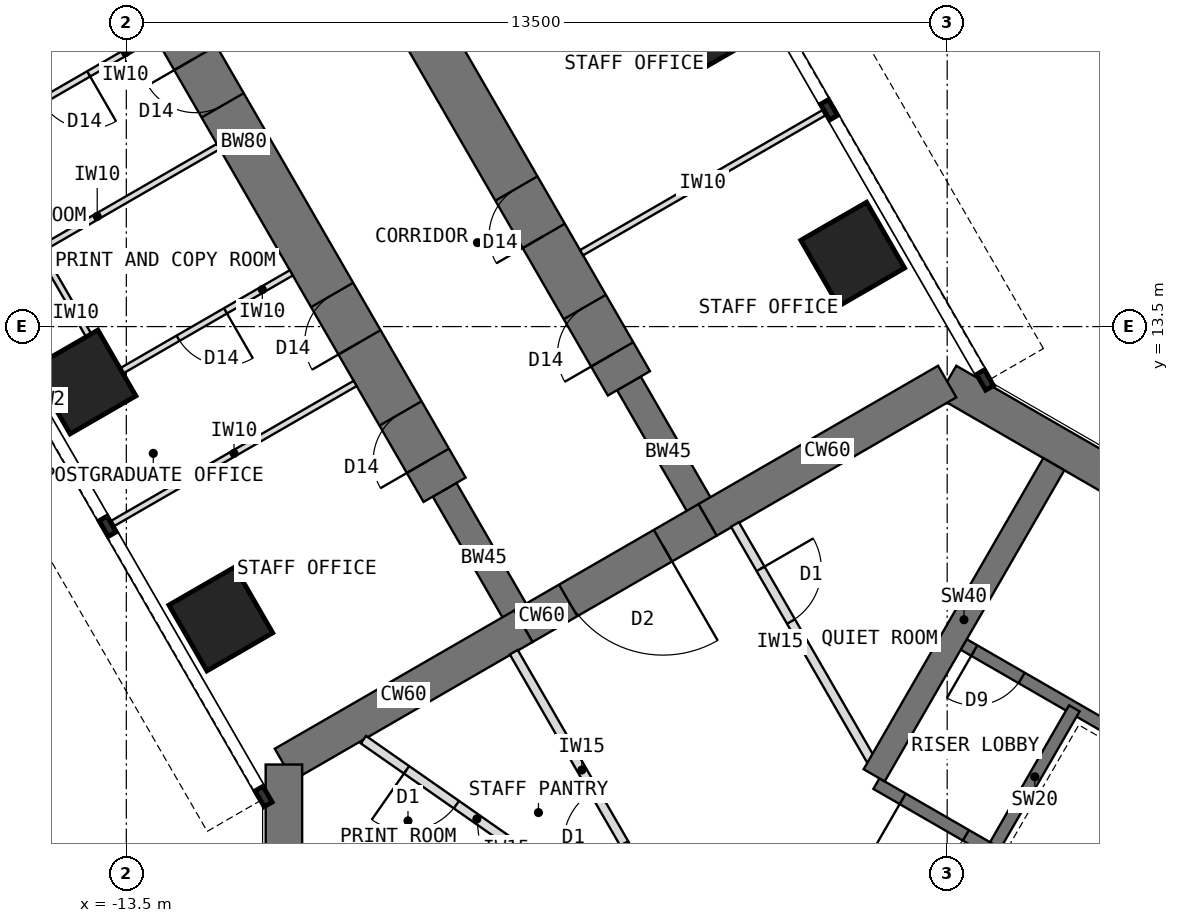
"""IFC4 building model, lengths in metres.
Left out: names, types, materials, properties, quantities, classifications, styles, units other than length and angle.
Written with IfcOpenShell. Run it as: python <this file> out.ifc"""

import sys

from ifc_helpers import new_model, si_unit, direction, frame, frame_2d, origin, origin_2d, place, context, subcontext, project, spatial, rectangle, extrude, element, fill, save


model = new_model("IFC4")
c1 = context("Model", 3, precision=1e-05, world=origin(), true_north=direction((0.0, 1.0)))
c2 = subcontext(c1, "Body", "Model", "MODEL_VIEW")
j1 = project(units=[si_unit("LENGTHUNIT", "METRE"), si_unit("PLANEANGLEUNIT", "RADIAN")], contexts=[c1])
p1 = place(None, origin())
s1 = spatial("IfcSite", under=j1, at=p1, CompositionType="ELEMENT")
p2 = place(p1, origin())
s2 = spatial("IfcBuilding", under=s1, at=p2, CompositionType="ELEMENT")
p3 = place(p2, frame((0.0, 0.0, 157.5)))
s3 = spatial("IfcBuildingStorey", under=s2, at=p3, CompositionType="ELEMENT", Elevation=157.5)
p4 = place(p3, frame((10.908, 6.298, 0.0), z_axis=(0.0, 0.0, 1.0), x_axis=(-0.866021940709, 0.500005998175, 0.0)))
e1 = element("IfcWall", 1, at=p4, inside=s3, PredefinedType="SHEAR", context=c2, shape_type="SweptSolid", body=[
    extrude(rectangle(XDim=12.596, YDim=0.6, at=frame_2d((6.298, 0.0))), origin(), (0.0, 0.0, 1.0), 4.0),
])
p5 = place(p3, frame((0.0, 12.596, 0.0), z_axis=(0.0, 0.0, 1.0), x_axis=(-0.866011268655, -0.500024481964, 0.0)))
e2 = element("IfcWall", 2, at=p5, inside=s3, PredefinedType="SHEAR", context=c2, shape_type="SweptSolid", body=[
    extrude(rectangle(XDim=4.548, YDim=0.6, at=frame_2d((2.274, 0.0))), origin(), (0.0, 0.0, 1.0), 4.0),
])
p6 = place(p3, frame((-3.939, 10.322, 0.0), z_axis=(0.0, 0.0, 1.0), x_axis=(-0.866019471182, -0.500010275428, 0.0)))
e3 = element("IfcWall", 3, at=p6, inside=s3, PredefinedType="SHEAR", context=c2, shape_type="SweptSolid", body=[
    extrude(rectangle(XDim=3.5, YDim=0.6, at=frame_2d((1.75, 0.0))), origin(), (0.0, 0.0, 1.0), 4.0),
])
p7 = place(p6, frame((0.85, 0.0, 0.0)))
e4 = element("IfcOpeningElement", 4, at=p7, cuts=e3, PredefinedType="OPENING", context=c2, shape_type="SweptSolid", body=[
    extrude(rectangle(XDim=1.8, YDim=2.1, at=frame_2d((0.9, 1.05))), frame((0.0, 0.31, 0.0), z_axis=(0.0, -1.0, 0.0), x_axis=(1.0, 0.0, 0.0)), (0.0, 0.0, 1.0), 0.62),
])
p8 = place(p3, frame((-6.97, 8.572, 0.0), z_axis=(0.0, 0.0, 1.0), x_axis=(-0.866034513004, -0.499984222037, 0.0)))
e5 = element("IfcWall", 5, at=p8, inside=s3, PredefinedType="SHEAR", context=c2, shape_type="SweptSolid", body=[
    extrude(rectangle(XDim=4.548, YDim=0.6, at=frame_2d((2.274, 0.0))), origin(), (0.0, 0.0, 1.0), 4.0),
])
p9 = place(p3, frame((-10.908, 6.298, 0.0), z_axis=(0.0, 0.0, 1.0), x_axis=(0.0, -1.0, 0.0)))
e6 = element("IfcWall", 6, at=p9, inside=s3, PredefinedType="SHEAR", context=c2, shape_type="SweptSolid", body=[
    extrude(rectangle(XDim=12.596, YDim=0.6, at=frame_2d((6.298, 0.0))), origin(), (0.0, 0.0, 1.0), 4.0),
])
p10 = place(p3, frame((-6.97, 8.572, 0.0), z_axis=(0.0, 0.0, 1.0), x_axis=(-0.499988811324, 0.866031863473, 0.0)))
e7 = element("IfcWall", 7, at=p10, inside=s3, PredefinedType="SHEAR", context=c2, shape_type="SweptSolid", body=[
    extrude(rectangle(XDim=2.592, YDim=0.45, at=frame_2d((1.296, 0.0))), origin(), (0.0, 0.0, 1.0), 4.0),
])
p11 = place(p3, frame((-8.266, 10.816, 0.0), z_axis=(0.0, 0.0, 1.0), x_axis=(-0.499996231654, 0.866027579429, 0.0)))
e8 = element("IfcWall", 8, at=p11, inside=s3, PredefinedType="SHEAR", context=c2, shape_type="SweptSolid", body=[
    extrude(rectangle(XDim=13.2, YDim=0.8, at=frame_2d((6.6, 0.0))), origin(), (0.0, 0.0, 1.0), 4.0),
])
p12 = place(p11, frame((0.55, 0.0, 0.0)))
e9 = element("IfcOpeningElement", 9, at=p12, cuts=e8, PredefinedType="OPENING", context=c2, shape_type="SweptSolid", body=[
    extrude(rectangle(XDim=0.9, YDim=2.1, at=frame_2d((0.45, 1.05))), frame((0.0, 0.41, 0.0), z_axis=(0.0, -1.0, 0.0), x_axis=(1.0, 0.0, 0.0)), (0.0, 0.0, 1.0), 0.82),
])
p13 = place(p11, frame((2.8, 0.0, 0.0)))
e10 = element("IfcOpeningElement", 10, at=p13, cuts=e8, PredefinedType="OPENING", context=c2, shape_type="SweptSolid", body=[
    extrude(rectangle(XDim=0.9, YDim=2.1, at=frame_2d((0.45, 1.05))), frame((0.0, 0.41, 0.0), z_axis=(0.0, -1.0, 0.0), x_axis=(1.0, 0.0, 0.0)), (0.0, 0.0, 1.0), 0.82),
])
p14 = place(p11, frame((7.3, 0.0, 0.0)))
e11 = element("IfcOpeningElement", 11, at=p14, cuts=e8, PredefinedType="OPENING", context=c2, shape_type="SweptSolid", body=[
    extrude(rectangle(XDim=0.9, YDim=2.1, at=frame_2d((0.45, 1.05))), frame((0.0, 0.41, 0.0), z_axis=(0.0, -1.0, 0.0), x_axis=(1.0, 0.0, 0.0)), (0.0, 0.0, 1.0), 0.82),
])
p15 = place(p3, frame((-3.939, 10.322, 0.0), z_axis=(0.0, 0.0, 1.0), x_axis=(-0.499918158782, 0.866072649678, 0.0)))
e12 = element("IfcWall", 12, at=p15, inside=s3, PredefinedType="SHEAR", context=c2, shape_type="SweptSolid", body=[
    extrude(rectangle(XDim=2.592, YDim=0.45, at=frame_2d((1.296, 0.0))), origin(), (0.0, 0.0, 1.0), 4.0),
])
p16 = place(p3, frame((-5.234, 12.566, 0.0), z_axis=(0.0, 0.0, 1.0), x_axis=(-0.500010103361, 0.866019570528, 0.0)))
e13 = element("IfcWall", 13, at=p16, inside=s3, PredefinedType="SHEAR", context=c2, shape_type="SweptSolid", body=[
    extrude(rectangle(XDim=13.2, YDim=0.8, at=frame_2d((6.6, 0.0))), origin(), (0.0, 0.0, 1.0), 4.0),
])
p17 = place(p16, frame((0.55, 0.0, 0.0)))
e14 = element("IfcOpeningElement", 14, at=p17, cuts=e13, PredefinedType="OPENING", context=c2, shape_type="SweptSolid", body=[
    extrude(rectangle(XDim=0.9, YDim=2.1, at=frame_2d((0.45, 1.05))), frame((0.0, 0.41, 0.0), z_axis=(0.0, -1.0, 0.0), x_axis=(1.0, 0.0, 0.0)), (0.0, 0.0, 1.0), 0.82),
])
p18 = place(p16, frame((2.8, 0.0, 0.0)))
e15 = element("IfcOpeningElement", 15, at=p18, cuts=e13, PredefinedType="OPENING", context=c2, shape_type="SweptSolid", body=[
    extrude(rectangle(XDim=0.9, YDim=2.1, at=frame_2d((0.45, 1.05))), frame((0.0, 0.41, 0.0), z_axis=(0.0, -1.0, 0.0), x_axis=(1.0, 0.0, 0.0)), (0.0, 0.0, 1.0), 0.82),
])
p19 = place(p16, frame((7.3, 0.0, 0.0)))
e16 = element("IfcOpeningElement", 16, at=p19, cuts=e13, PredefinedType="OPENING", context=c2, shape_type="SweptSolid", body=[
    extrude(rectangle(XDim=0.9, YDim=2.1, at=frame_2d((0.45, 1.05))), frame((0.0, 0.41, 0.0), z_axis=(0.0, -1.0, 0.0), x_axis=(1.0, 0.0, 0.0)), (0.0, 0.0, 1.0), 0.82),
])
for number, where, z_axis, x_axis in (
    (17, (-11.946, 8.691, 0.0), (0.0, 0.0, 1.0), (0.866, 0.5, 0.0)),
    (18, (-1.554, 14.691, 0.0), (0.0, 0.0, 1.0), (0.866, 0.5, 0.0)),
    (19, (-14.196, 12.588, 0.0), (0.0, 0.0, 1.0), (0.866, 0.5, 0.0)),
    (20, (-3.804, 18.588, 0.0), (0.0, 0.0, 1.0), (0.866, 0.5, 0.0)),
):
    element("IfcColumn", number, at=place(p3, frame(where, z_axis=z_axis, x_axis=x_axis)), inside=s3, PredefinedType="COLUMN", context=c2, shape_type="SweptSolid", body=[
        extrude(rectangle(XDim=1.25, YDim=1.25, at=origin_2d()), origin(), (0.0, 0.0, 1.0), 4.0),
    ])
p20 = place(p3, frame((5.764, 1.984, 0.0), z_axis=(0.0, 0.0, 1.0), x_axis=(-0.866026010844, 0.49999894854, 0.0)))
e21 = element("IfcWall", 21, at=p20, inside=s3, PredefinedType="SHEAR", context=c2, shape_type="SweptSolid", body=[
    extrude(rectangle(XDim=8.0, YDim=0.2, at=frame_2d((4.0, 0.0))), origin(), (0.0, 0.0, 1.0), 4.0),
])
p21 = place(p20, frame((6.3, 0.0, 0.0)))
e22 = element("IfcOpeningElement", 22, at=p21, cuts=e21, PredefinedType="OPENING", context=c2, shape_type="SweptSolid", body=[
    extrude(rectangle(XDim=1.2, YDim=2.1, at=frame_2d((0.6, 1.05))), frame((0.0, 0.11, 0.0), z_axis=(0.0, -1.0, 0.0), x_axis=(1.0, 0.0, 0.0)), (0.0, 0.0, 1.0), 0.22),
])
p22 = place(p3, frame((0.791, 4.97, 0.0), z_axis=(0.0, 0.0, 1.0), x_axis=(0.499936506574, 0.866062058628, 0.0)))
e23 = element("IfcWall", 23, at=p22, inside=s3, PredefinedType="SHEAR", context=c2, shape_type="SweptSolid", body=[
    extrude(rectangle(XDim=2.6, YDim=0.2, at=frame_2d((1.3, 0.0))), origin(), (0.0, 0.0, 1.0), 4.0),
])
p23 = place(p3, frame((7.114, 4.322, 0.0), z_axis=(0.0, 0.0, 1.0), x_axis=(-0.866026010844, 0.49999894854, 0.0)))
e24 = element("IfcWall", 24, at=p23, inside=s3, PredefinedType="SHEAR", context=c2, shape_type="SweptSolid", body=[
    extrude(rectangle(XDim=8.0, YDim=0.2, at=frame_2d((4.0, 0.0))), origin(), (0.0, 0.0, 1.0), 4.0),
])
p24 = place(p23, frame((6.8, 0.0, 0.0)))
e25 = element("IfcOpeningElement", 25, at=p24, cuts=e24, PredefinedType="OPENING", context=c2, shape_type="SweptSolid", body=[
    extrude(rectangle(XDim=0.9, YDim=2.1, at=frame_2d((0.45, 1.05))), frame((0.0, 0.11, 0.0), z_axis=(0.0, -1.0, 0.0), x_axis=(1.0, 0.0, 0.0)), (0.0, 0.0, 1.0), 0.22),
])
p25 = place(p3, frame((-1.201, 6.12, 0.0), z_axis=(0.0, 0.0, 1.0), x_axis=(0.49999668571, 0.866027317282, 0.0)))
e26 = element("IfcWall", 26, at=p25, inside=s3, PredefinedType="SHEAR", context=c2, shape_type="SweptSolid", body=[
    extrude(rectangle(XDim=5.908, YDim=0.4, at=frame_2d((2.954, 0.0))), origin(), (0.0, 0.0, 1.0), 4.0),
])
for number, where, z_axis, x_axis in (
    (27, (-9.737, 12.565, 0.0), (0.0, 0.0, 1.0), (-0.866, -0.5, 0.0)),
    (28, (-11.987, 16.462, 0.0), (0.0, 0.0, 1.0), (-0.866, -0.5, 0.0)),
):
    element("IfcWall", number, at=place(p3, frame(where, z_axis=z_axis, x_axis=x_axis)), inside=s3, PredefinedType="PARTITIONING", context=c2, shape_type="SweptSolid", body=[
        extrude(rectangle(XDim=4.6, YDim=0.1, at=frame_2d((2.3, 0.0))), origin(), (0.0, 0.0, 1.0), 3.8),
    ])
p26 = place(p3, frame((-13.731, 12.684, 0.0), z_axis=(0.0, 0.0, 1.0), x_axis=(-0.500001309137, 0.866024647952, 0.0)))
e29 = element("IfcWall", 29, at=p26, inside=s3, PredefinedType="PARTITIONING", context=c2, shape_type="SweptSolid", body=[
    extrude(rectangle(XDim=2.4, YDim=0.1, at=frame_2d((1.2, 0.0))), origin(), (0.0, 0.0, 1.0), 3.8),
])
p27 = place(p3, frame((-10.787, 14.384, 0.0), z_axis=(0.0, 0.0, 1.0), x_axis=(-0.866038511948, -0.499977295307, 0.0)))
e30 = element("IfcWall", 30, at=p27, inside=s3, PredefinedType="PARTITIONING", context=c2, shape_type="SweptSolid", body=[
    extrude(rectangle(XDim=3.4, YDim=0.1, at=frame_2d((1.7, 0.0))), origin(), (0.0, 0.0, 1.0), 3.8),
])
p28 = place(p27, frame((1.25, 0.0, 0.0)))
e31 = element("IfcOpeningElement", 31, at=p28, cuts=e30, PredefinedType="OPENING", context=c2, shape_type="SweptSolid", body=[
    extrude(rectangle(XDim=0.9, YDim=2.1, at=frame_2d((0.45, 1.05))), frame((0.0, 0.06, 0.0), z_axis=(0.0, -1.0, 0.0), x_axis=(1.0, 0.0, 0.0)), (0.0, 0.0, 1.0), 0.12),
])
p29 = place(p3, frame((-13.037, 18.281, 0.0), z_axis=(0.0, 0.0, 1.0), x_axis=(-0.866007419912, -0.500031147688, 0.0)))
e32 = element("IfcWall", 32, at=p29, inside=s3, PredefinedType="PARTITIONING", context=c2, shape_type="SweptSolid", body=[
    extrude(rectangle(XDim=3.4, YDim=0.1, at=frame_2d((1.7, 0.0))), origin(), (0.0, 0.0, 1.0), 3.8),
])
p30 = place(p29, frame((1.25, 0.0, 0.0)))
e33 = element("IfcOpeningElement", 33, at=p30, cuts=e32, PredefinedType="OPENING", context=c2, shape_type="SweptSolid", body=[
    extrude(rectangle(XDim=0.9, YDim=2.1, at=frame_2d((0.45, 1.05))), frame((0.0, 0.06, 0.0), z_axis=(0.0, -1.0, 0.0), x_axis=(1.0, 0.0, 0.0)), (0.0, 0.0, 1.0), 0.12),
])
p31 = place(p3, frame((-6.013, 14.715, 0.0), z_axis=(0.0, 0.0, 1.0), x_axis=(0.866016770315, 0.500014953309, 0.0)))
e34 = element("IfcWall", 34, at=p31, inside=s3, PredefinedType="PARTITIONING", context=c2, shape_type="SweptSolid", body=[
    extrude(rectangle(XDim=4.6, YDim=0.1, at=frame_2d((2.3, 0.0))), origin(), (0.0, 0.0, 1.0), 3.8),
])
p32 = place(p3, frame((-4.89, 4.27, 0.0), z_axis=(0.0, 0.0, 1.0), x_axis=(-0.499999473313, 0.866025707867, 0.0)))
e35 = element("IfcWall", 35, at=p32, inside=s3, PredefinedType="PARTITIONING", context=c2, shape_type="SweptSolid", body=[
    extrude(rectangle(XDim=4.476, YDim=0.15, at=frame_2d((2.238, 0.0))), origin(), (0.0, 0.0, 1.0), 3.8),
])
p33 = place(p32, frame((0.843, 0.0, 0.0)))
e36 = element("IfcOpeningElement", 36, at=p33, cuts=e35, PredefinedType="OPENING", context=c2, shape_type="SweptSolid", body=[
    extrude(rectangle(XDim=1.0, YDim=2.1, at=frame_2d((0.5, 1.05))), frame((0.0, 0.085, 0.0), z_axis=(0.0, -1.0, 0.0), x_axis=(1.0, 0.0, 0.0)), (0.0, 0.0, 1.0), 0.17),
])
p34 = place(p3, frame((-3.49, 10.246, 0.0), z_axis=(0.0, 0.0, 1.0), x_axis=(0.499999473313, -0.866025707867, 0.0)))
e37 = element("IfcWall", 37, at=p34, inside=s3, PredefinedType="PARTITIONING", context=c2, shape_type="SweptSolid", body=[
    extrude(rectangle(XDim=4.476, YDim=0.15, at=frame_2d((2.238, 0.0))), origin(), (0.0, 0.0, 1.0), 3.8),
])
p35 = place(p34, frame((0.843, 0.0, 0.0)))
e38 = element("IfcOpeningElement", 38, at=p35, cuts=e37, PredefinedType="OPENING", context=c2, shape_type="SweptSolid", body=[
    extrude(rectangle(XDim=1.0, YDim=2.1, at=frame_2d((0.5, 1.05))), frame((0.0, 0.085, 0.0), z_axis=(0.0, -1.0, 0.0), x_axis=(1.0, 0.0, 0.0)), (0.0, 0.0, 1.0), 0.17),
])
p36 = place(p3, frame((-5.869, 4.1, 0.0), z_axis=(0.0, 0.0, 1.0), x_axis=(-0.819788459852, 0.572666465836, 0.0)))
e39 = element("IfcWall", 39, at=p36, inside=s3, PredefinedType="PARTITIONING", context=c2, shape_type="SweptSolid", body=[
    extrude(rectangle(XDim=4.552, YDim=0.15, at=frame_2d((2.276, 0.0))), origin(), (0.0, 0.0, 1.0), 3.8),
])
p37 = place(p36, frame((2.686, 0.0, 0.0)))
e40 = element("IfcOpeningElement", 40, at=p37, cuts=e39, PredefinedType="OPENING", context=c2, shape_type="SweptSolid", body=[
    extrude(rectangle(XDim=1.0, YDim=2.1, at=frame_2d((0.5, 1.05))), frame((0.0, 0.085, 0.0), z_axis=(0.0, -1.0, 0.0), x_axis=(1.0, 0.0, 0.0)), (0.0, 0.0, 1.0), 0.17),
])
p38 = place(p21, origin())
e41 = element("IfcDoor", 41, at=p38, inside=s3, OperationType="SINGLE_SWING_RIGHT", PredefinedType="DOOR", context=c2, shape_type="SweptSolid", body=[
    extrude(rectangle(XDim=1.2, YDim=2.1, at=frame_2d((0.6, 1.05))), frame((0.0, 0.025, 0.0), z_axis=(0.0, -1.0, 0.0), x_axis=(1.0, 0.0, 0.0)), (0.0, 0.0, 1.0), 0.05),
])
fill(e22, e41)
p39 = place(p24, origin())
e42 = element("IfcDoor", 42, at=p39, inside=s3, OperationType="SINGLE_SWING_RIGHT", PredefinedType="DOOR", context=c2, shape_type="SweptSolid", body=[
    extrude(rectangle(XDim=0.9, YDim=2.1, at=frame_2d((0.45, 1.05))), frame((0.0, 0.025, 0.0), z_axis=(0.0, -1.0, 0.0), x_axis=(1.0, 0.0, 0.0)), (0.0, 0.0, 1.0), 0.05),
])
fill(e25, e42)
p40 = place(p7, origin())
e43 = element("IfcDoor", 43, at=p40, inside=s3, OperationType="DOUBLE_DOOR_DOUBLE_SWING", PredefinedType="DOOR", context=c2, shape_type="SweptSolid", body=[
    extrude(rectangle(XDim=1.72, YDim=2.06, at=frame_2d((0.9, 1.03))), frame((0.0, 0.025, 0.0), z_axis=(0.0, -1.0, 0.0), x_axis=(1.0, 0.0, 0.0)), (0.0, 0.0, 1.0), 0.05),
    extrude(rectangle(XDim=0.04, YDim=2.1, at=frame_2d((0.02, 1.05))), frame((0.0, 0.3, 0.0), z_axis=(0.0, -1.0, 0.0), x_axis=(1.0, 0.0, 0.0)), (0.0, 0.0, 1.0), 0.6),
    extrude(rectangle(XDim=0.04, YDim=2.1, at=frame_2d((1.78, 1.05))), frame((0.0, 0.3, 0.0), z_axis=(0.0, -1.0, 0.0), x_axis=(1.0, 0.0, 0.0)), (0.0, 0.0, 1.0), 0.6),
    extrude(rectangle(XDim=1.72, YDim=0.04, at=frame_2d((0.9, 2.08))), frame((0.0, 0.3, 0.0), z_axis=(0.0, -1.0, 0.0), x_axis=(1.0, 0.0, 0.0)), (0.0, 0.0, 1.0), 0.6),
])
fill(e4, e43)
p41 = place(p28, origin())
e44 = element("IfcDoor", 44, at=p41, inside=s3, OperationType="SINGLE_SWING_LEFT", PredefinedType="DOOR", context=c2, shape_type="SweptSolid", body=[
    extrude(rectangle(XDim=0.9, YDim=2.1, at=frame_2d((0.45, 1.05))), frame((0.0, 0.025, 0.0), z_axis=(0.0, -1.0, 0.0), x_axis=(1.0, 0.0, 0.0)), (0.0, 0.0, 1.0), 0.05),
])
fill(e31, e44)
p42 = place(p30, origin())
e45 = element("IfcDoor", 45, at=p42, inside=s3, OperationType="SINGLE_SWING_LEFT", PredefinedType="DOOR", context=c2, shape_type="SweptSolid", body=[
    extrude(rectangle(XDim=0.9, YDim=2.1, at=frame_2d((0.45, 1.05))), frame((0.0, 0.025, 0.0), z_axis=(0.0, -1.0, 0.0), x_axis=(1.0, 0.0, 0.0)), (0.0, 0.0, 1.0), 0.05),
])
fill(e33, e45)
p43 = place(p35, origin())
e46 = element("IfcDoor", 46, at=p43, inside=s3, OperationType="SINGLE_SWING_LEFT", PredefinedType="DOOR", context=c2, shape_type="SweptSolid", body=[
    extrude(rectangle(XDim=1.0, YDim=2.1, at=frame_2d((0.5, 1.05))), frame((0.0, 0.025, 0.0), z_axis=(0.0, -1.0, 0.0), x_axis=(1.0, 0.0, 0.0)), (0.0, 0.0, 1.0), 0.05),
])
fill(e38, e46)
p44 = place(p37, origin())
e47 = element("IfcDoor", 47, at=p44, inside=s3, OperationType="SINGLE_SWING_RIGHT", PredefinedType="DOOR", context=c2, shape_type="SweptSolid", body=[
    extrude(rectangle(XDim=1.0, YDim=2.1, at=frame_2d((0.5, 1.05))), frame((0.0, 0.025, 0.0), z_axis=(0.0, -1.0, 0.0), x_axis=(1.0, 0.0, 0.0)), (0.0, 0.0, 1.0), 0.05),
])
fill(e40, e47)
p45 = place(p33, origin())
e48 = element("IfcDoor", 48, at=p45, inside=s3, OperationType="SINGLE_SWING_LEFT", PredefinedType="DOOR", context=c2, shape_type="SweptSolid", body=[
    extrude(rectangle(XDim=1.0, YDim=2.1, at=frame_2d((0.5, 1.05))), frame((0.0, 0.025, 0.0), z_axis=(0.0, -1.0, 0.0), x_axis=(1.0, 0.0, 0.0)), (0.0, 0.0, 1.0), 0.05),
])
fill(e36, e48)
p46 = place(p12, origin())
e49 = element("IfcDoor", 49, at=p46, inside=s3, OperationType="SINGLE_SWING_LEFT", PredefinedType="DOOR", context=c2, shape_type="SweptSolid", body=[
    extrude(rectangle(XDim=0.82, YDim=2.06, at=frame_2d((0.45, 1.03))), frame((0.0, 0.025, 0.0), z_axis=(0.0, -1.0, 0.0), x_axis=(1.0, 0.0, 0.0)), (0.0, 0.0, 1.0), 0.05),
    extrude(rectangle(XDim=0.04, YDim=2.1, at=frame_2d((0.02, 1.05))), frame((0.0, 0.4, 0.0), z_axis=(0.0, -1.0, 0.0), x_axis=(1.0, 0.0, 0.0)), (0.0, 0.0, 1.0), 0.8),
    extrude(rectangle(XDim=0.04, YDim=2.1, at=frame_2d((0.88, 1.05))), frame((0.0, 0.4, 0.0), z_axis=(0.0, -1.0, 0.0), x_axis=(1.0, 0.0, 0.0)), (0.0, 0.0, 1.0), 0.8),
    extrude(rectangle(XDim=0.82, YDim=0.04, at=frame_2d((0.45, 2.08))), frame((0.0, 0.4, 0.0), z_axis=(0.0, -1.0, 0.0), x_axis=(1.0, 0.0, 0.0)), (0.0, 0.0, 1.0), 0.8),
])
fill(e9, e49)
p47 = place(p13, origin())
e50 = element("IfcDoor", 50, at=p47, inside=s3, OperationType="SINGLE_SWING_LEFT", PredefinedType="DOOR", context=c2, shape_type="SweptSolid", body=[
    extrude(rectangle(XDim=0.82, YDim=2.06, at=frame_2d((0.45, 1.03))), frame((0.0, 0.025, 0.0), z_axis=(0.0, -1.0, 0.0), x_axis=(1.0, 0.0, 0.0)), (0.0, 0.0, 1.0), 0.05),
    extrude(rectangle(XDim=0.04, YDim=2.1, at=frame_2d((0.02, 1.05))), frame((0.0, 0.4, 0.0), z_axis=(0.0, -1.0, 0.0), x_axis=(1.0, 0.0, 0.0)), (0.0, 0.0, 1.0), 0.8),
    extrude(rectangle(XDim=0.04, YDim=2.1, at=frame_2d((0.88, 1.05))), frame((0.0, 0.4, 0.0), z_axis=(0.0, -1.0, 0.0), x_axis=(1.0, 0.0, 0.0)), (0.0, 0.0, 1.0), 0.8),
    extrude(rectangle(XDim=0.82, YDim=0.04, at=frame_2d((0.45, 2.08))), frame((0.0, 0.4, 0.0), z_axis=(0.0, -1.0, 0.0), x_axis=(1.0, 0.0, 0.0)), (0.0, 0.0, 1.0), 0.8),
])
fill(e10, e50)
p48 = place(p14, origin())
e51 = element("IfcDoor", 51, at=p48, inside=s3, OperationType="SINGLE_SWING_RIGHT", PredefinedType="DOOR", context=c2, shape_type="SweptSolid", body=[
    extrude(rectangle(XDim=0.82, YDim=2.06, at=frame_2d((0.45, 1.03))), frame((0.0, 0.025, 0.0), z_axis=(0.0, -1.0, 0.0), x_axis=(1.0, 0.0, 0.0)), (0.0, 0.0, 1.0), 0.05),
    extrude(rectangle(XDim=0.04, YDim=2.1, at=frame_2d((0.02, 1.05))), frame((0.0, 0.4, 0.0), z_axis=(0.0, -1.0, 0.0), x_axis=(1.0, 0.0, 0.0)), (0.0, 0.0, 1.0), 0.8),
    extrude(rectangle(XDim=0.04, YDim=2.1, at=frame_2d((0.88, 1.05))), frame((0.0, 0.4, 0.0), z_axis=(0.0, -1.0, 0.0), x_axis=(1.0, 0.0, 0.0)), (0.0, 0.0, 1.0), 0.8),
    extrude(rectangle(XDim=0.82, YDim=0.04, at=frame_2d((0.45, 2.08))), frame((0.0, 0.4, 0.0), z_axis=(0.0, -1.0, 0.0), x_axis=(1.0, 0.0, 0.0)), (0.0, 0.0, 1.0), 0.8),
])
fill(e11, e51)
p49 = place(p17, origin())
e52 = element("IfcDoor", 52, at=p49, inside=s3, OperationType="SINGLE_SWING_LEFT", PredefinedType="DOOR", context=c2, shape_type="SweptSolid", body=[
    extrude(rectangle(XDim=0.82, YDim=2.06, at=frame_2d((0.45, 1.03))), frame((0.0, 0.025, 0.0), z_axis=(0.0, -1.0, 0.0), x_axis=(1.0, 0.0, 0.0)), (0.0, 0.0, 1.0), 0.05),
    extrude(rectangle(XDim=0.04, YDim=2.1, at=frame_2d((0.02, 1.05))), frame((0.0, 0.4, 0.0), z_axis=(0.0, -1.0, 0.0), x_axis=(1.0, 0.0, 0.0)), (0.0, 0.0, 1.0), 0.8),
    extrude(rectangle(XDim=0.04, YDim=2.1, at=frame_2d((0.88, 1.05))), frame((0.0, 0.4, 0.0), z_axis=(0.0, -1.0, 0.0), x_axis=(1.0, 0.0, 0.0)), (0.0, 0.0, 1.0), 0.8),
    extrude(rectangle(XDim=0.82, YDim=0.04, at=frame_2d((0.45, 2.08))), frame((0.0, 0.4, 0.0), z_axis=(0.0, -1.0, 0.0), x_axis=(1.0, 0.0, 0.0)), (0.0, 0.0, 1.0), 0.8),
])
fill(e14, e52)
p50 = place(p18, origin())
e53 = element("IfcDoor", 53, at=p50, inside=s3, OperationType="SINGLE_SWING_LEFT", PredefinedType="DOOR", context=c2, shape_type="SweptSolid", body=[
    extrude(rectangle(XDim=0.82, YDim=2.06, at=frame_2d((0.45, 1.03))), frame((0.0, 0.025, 0.0), z_axis=(0.0, -1.0, 0.0), x_axis=(1.0, 0.0, 0.0)), (0.0, 0.0, 1.0), 0.05),
    extrude(rectangle(XDim=0.04, YDim=2.1, at=frame_2d((0.02, 1.05))), frame((0.0, 0.4, 0.0), z_axis=(0.0, -1.0, 0.0), x_axis=(1.0, 0.0, 0.0)), (0.0, 0.0, 1.0), 0.8),
    extrude(rectangle(XDim=0.04, YDim=2.1, at=frame_2d((0.88, 1.05))), frame((0.0, 0.4, 0.0), z_axis=(0.0, -1.0, 0.0), x_axis=(1.0, 0.0, 0.0)), (0.0, 0.0, 1.0), 0.8),
    extrude(rectangle(XDim=0.82, YDim=0.04, at=frame_2d((0.45, 2.08))), frame((0.0, 0.4, 0.0), z_axis=(0.0, -1.0, 0.0), x_axis=(1.0, 0.0, 0.0)), (0.0, 0.0, 1.0), 0.8),
])
fill(e15, e53)
save(model, sys.argv[1])
